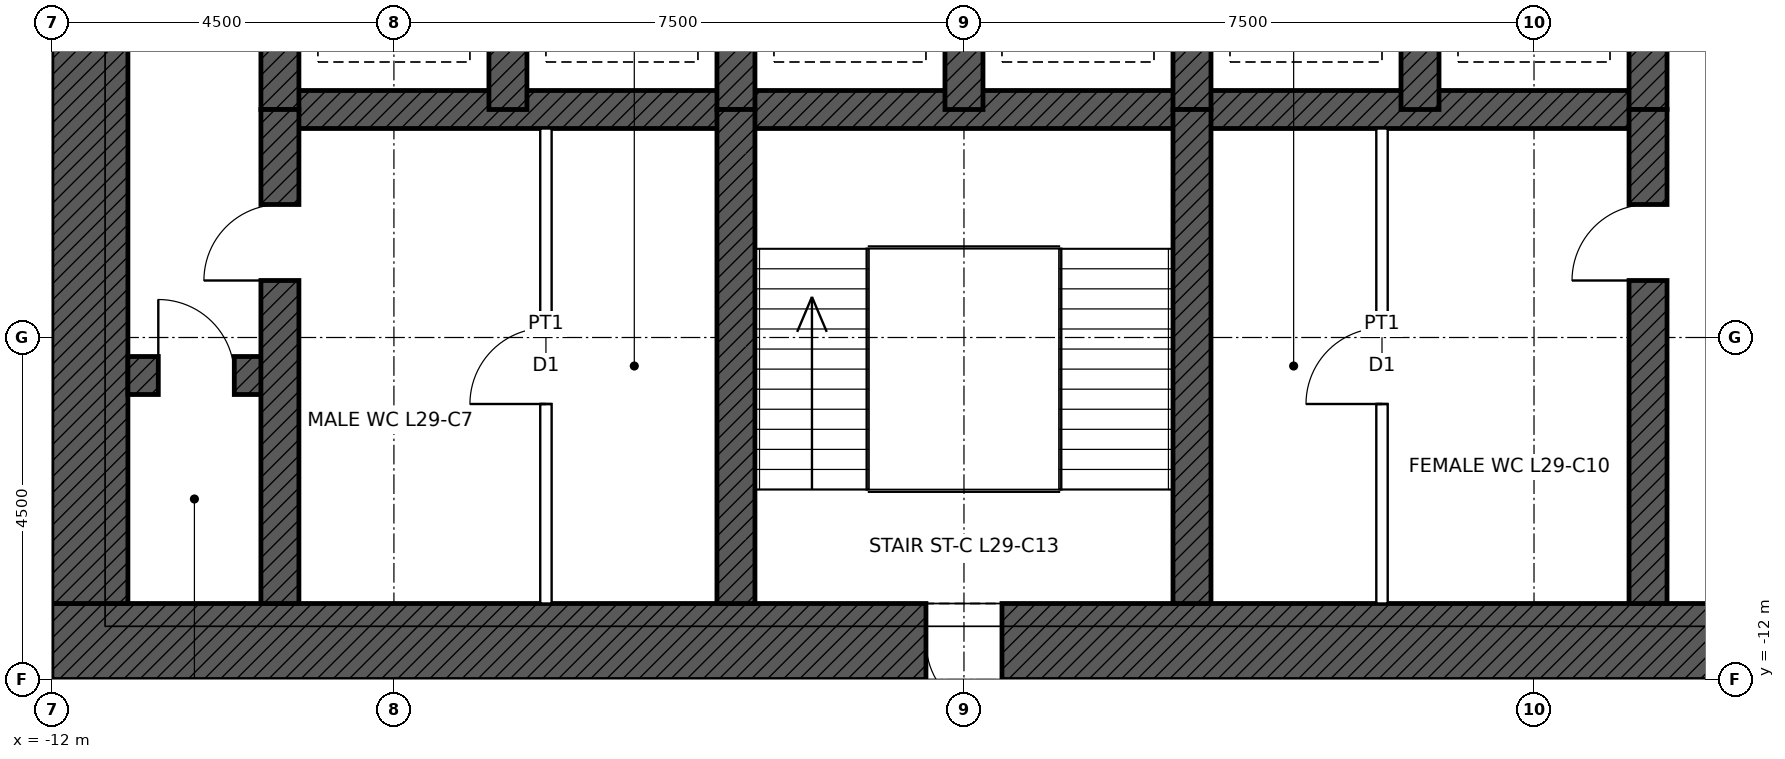
"""IFC4 building model, lengths in metres.
Left out: names, types, materials, properties, quantities, classifications, styles, units other than length and angle.
Written with IfcOpenShell. Run it as: python <this file> out.ifc"""

import sys

from ifc_helpers import new_model, si_unit, direction, frame, frame_2d, origin, place, context, subcontext, project, spatial, rectangle, extrude, element, fill, save


model = new_model("IFC4")
c1 = context("Model", 3, precision=1e-05, world=origin(), true_north=direction((0.0, 1.0)))
c2 = subcontext(c1, "Body", "Model", "MODEL_VIEW")
j1 = project(units=[si_unit("LENGTHUNIT", "METRE"), si_unit("PLANEANGLEUNIT", "RADIAN")], contexts=[c1])
p1 = place(None, origin())
s1 = spatial("IfcSite", under=j1, at=p1, CompositionType="ELEMENT")
p2 = place(p1, origin())
s2 = spatial("IfcBuilding", under=s1, at=p2, CompositionType="ELEMENT")
p3 = place(p2, frame((0.0, 0.0, 144.9)))
s3 = spatial("IfcBuildingStorey", under=s2, at=p3, CompositionType="ELEMENT", Elevation=144.9)
p4 = place(p3, frame((12.0, -11.5, 0.0), z_axis=(0.0, 0.0, 1.0), x_axis=(-1.0, 0.0, 0.0)))
e1 = element("IfcWall", 1, at=p4, inside=s3, PredefinedType="SHEAR", context=c2, shape_type="SweptSolid", body=[
    extrude(rectangle(XDim=24.0, YDim=1.0, at=frame_2d((12.0, 0.0))), origin(), (0.0, 0.0, 1.0), 4.5),
])
p5 = place(p4, frame((11.5, 0.0, 0.0)))
e2 = element("IfcOpeningElement", 2, at=p5, cuts=e1, PredefinedType="OPENING", context=c2, shape_type="SweptSolid", body=[
    extrude(rectangle(XDim=1.0, YDim=2.1, at=frame_2d((0.5, 1.05))), frame((0.0, 0.51, 0.0), z_axis=(0.0, -1.0, 0.0), x_axis=(1.0, 0.0, 0.0)), (0.0, 0.0, 1.0), 1.02),
])
p6 = place(p4, frame((1.0, 0.0, 0.0)))
e3 = element("IfcOpeningElement", 3, at=p6, cuts=e1, PredefinedType="OPENING", context=c2, shape_type="SweptSolid", body=[
    extrude(rectangle(XDim=1.0, YDim=2.4, at=frame_2d((0.5, 1.2))), frame((0.0, 0.51, 0.0), z_axis=(0.0, -1.0, 0.0), x_axis=(1.0, 0.0, 0.0)), (0.0, 0.0, 1.0), 1.02),
])
p7 = place(p3, frame((-11.5, -11.0, 0.0), z_axis=(0.0, 0.0, 1.0), x_axis=(0.0, 1.0, 0.0)))
e4 = element("IfcWall", 4, at=p7, inside=s3, PredefinedType="SHEAR", context=c2, shape_type="SweptSolid", body=[
    extrude(rectangle(XDim=22.0, YDim=1.0, at=frame_2d((11.0, 0.0))), origin(), (0.0, 0.0, 1.0), 4.5),
])
p8 = place(p7, frame((10.5, 0.0, 0.0)))
e5 = element("IfcOpeningElement", 5, at=p8, cuts=e4, PredefinedType="OPENING", context=c2, shape_type="SweptSolid", body=[
    extrude(rectangle(XDim=1.0, YDim=2.4, at=frame_2d((0.5, 1.2))), frame((0.0, 0.51, 0.0), z_axis=(0.0, -1.0, 0.0), x_axis=(1.0, 0.0, 0.0)), (0.0, 0.0, 1.0), 1.02),
])
p9 = place(p3, frame((-9.0, -4.5, 0.0), z_axis=(0.0, 0.0, 1.0), x_axis=(1.0, 0.0, 0.0)))
e6 = element("IfcWall", 6, at=p9, inside=s3, PredefinedType="SHEAR", context=c2, shape_type="SweptSolid", body=[
    extrude(rectangle(XDim=18.0, YDim=0.5, at=frame_2d((9.0, 0.0))), origin(), (0.0, 0.0, 1.0), 4.5),
])
p10 = place(p3, frame((-11.0, -8.0, 0.0), z_axis=(0.0, 0.0, 1.0), x_axis=(1.0, 0.0, 0.0)))
e7 = element("IfcWall", 7, at=p10, inside=s3, PredefinedType="SHEAR", context=c2, shape_type="SweptSolid", body=[
    extrude(rectangle(XDim=2.0, YDim=0.5, at=frame_2d((1.0, 0.0))), origin(), (0.0, 0.0, 1.0), 4.5),
])
p11 = place(p10, frame((0.4, 0.0, 0.0)))
e8 = element("IfcOpeningElement", 8, at=p11, cuts=e7, PredefinedType="OPENING", context=c2, shape_type="SweptSolid", body=[
    extrude(rectangle(XDim=1.0, YDim=2.1, at=frame_2d((0.5, 1.05))), frame((0.0, 0.26, 0.0), z_axis=(0.0, -1.0, 0.0), x_axis=(1.0, 0.0, 0.0)), (0.0, 0.0, 1.0), 0.52),
])
for number, where, z_axis, x_axis in (
    (9, (-9.0, -4.5, 0.0), (0.0, 0.0, 1.0), (0.0, 1.0, 0.0)),
    (10, (9.0, -4.5, 0.0), (0.0, 0.0, 1.0), (0.0, 1.0, 0.0)),
    (11, (-6.0, -4.5, 0.0), (0.0, 0.0, 1.0), (0.0, 1.0, 0.0)),
    (12, (-3.0, -4.5, 0.0), (0.0, 0.0, 1.0), (0.0, 1.0, 0.0)),
    (13, (0.0, -4.5, 0.0), (0.0, 0.0, 1.0), (0.0, 1.0, 0.0)),
    (14, (3.0, -4.5, 0.0), (0.0, 0.0, 1.0), (0.0, 1.0, 0.0)),
    (15, (6.0, -4.5, 0.0), (0.0, 0.0, 1.0), (0.0, 1.0, 0.0)),
):
    element("IfcWall", number, at=place(p3, frame(where, z_axis=z_axis, x_axis=x_axis)), inside=s3, PredefinedType="SHEAR", context=c2, shape_type="SweptSolid", body=[
        extrude(rectangle(XDim=3.0, YDim=0.5, at=frame_2d((1.5, 0.0))), origin(), (0.0, 0.0, 1.0), 4.5),
    ])
p12 = place(p3, frame((-9.0, -11.0, 0.0), z_axis=(0.0, 0.0, 1.0), x_axis=(0.0, 1.0, 0.0)))
e16 = element("IfcWall", 16, at=p12, inside=s3, PredefinedType="SHEAR", context=c2, shape_type="SweptSolid", body=[
    extrude(rectangle(XDim=6.5, YDim=0.5, at=frame_2d((3.25, 0.0))), origin(), (0.0, 0.0, 1.0), 4.5),
])
p13 = place(p12, frame((4.25, 0.0, 0.0)))
e17 = element("IfcOpeningElement", 17, at=p13, cuts=e16, PredefinedType="OPENING", context=c2, shape_type="SweptSolid", body=[
    extrude(rectangle(XDim=1.0, YDim=2.1, at=frame_2d((0.5, 1.05))), frame((0.0, 0.26, 0.0), z_axis=(0.0, -1.0, 0.0), x_axis=(1.0, 0.0, 0.0)), (0.0, 0.0, 1.0), 0.52),
])
p14 = place(p3, frame((9.0, -11.0, 0.0), z_axis=(0.0, 0.0, 1.0), x_axis=(0.0, 1.0, 0.0)))
e18 = element("IfcWall", 18, at=p14, inside=s3, PredefinedType="SHEAR", context=c2, shape_type="SweptSolid", body=[
    extrude(rectangle(XDim=6.5, YDim=0.5, at=frame_2d((3.25, 0.0))), origin(), (0.0, 0.0, 1.0), 4.5),
])
p15 = place(p14, frame((4.25, 0.0, 0.0)))
e19 = element("IfcOpeningElement", 19, at=p15, cuts=e18, PredefinedType="OPENING", context=c2, shape_type="SweptSolid", body=[
    extrude(rectangle(XDim=1.0, YDim=2.1, at=frame_2d((0.5, 1.05))), frame((0.0, 0.26, 0.0), z_axis=(0.0, -1.0, 0.0), x_axis=(1.0, 0.0, 0.0)), (0.0, 0.0, 1.0), 0.52),
])
for number, where, z_axis, x_axis in (
    (20, (-3.0, -11.0, 0.0), (0.0, 0.0, 1.0), (0.0, 1.0, 0.0)),
    (21, (3.0, -11.0, 0.0), (0.0, 0.0, 1.0), (0.0, 1.0, 0.0)),
):
    element("IfcWall", number, at=place(p3, frame(where, z_axis=z_axis, x_axis=x_axis)), inside=s3, PredefinedType="SHEAR", context=c2, shape_type="SweptSolid", body=[
        extrude(rectangle(XDim=6.5, YDim=0.5, at=frame_2d((3.25, 0.0))), origin(), (0.0, 0.0, 1.0), 4.5),
    ])
p16 = place(p3, frame((-5.5, -11.0, 0.0), z_axis=(0.0, 0.0, 1.0), x_axis=(0.0, 1.0, 0.0)))
e22 = element("IfcWall", 22, at=p16, inside=s3, PredefinedType="PARTITIONING", context=c2, shape_type="SweptSolid", body=[
    extrude(rectangle(XDim=6.25, YDim=0.15, at=frame_2d((3.125, 0.0))), origin(), (0.0, 0.0, 1.0), 4.25),
])
p17 = place(p16, frame((2.625, 0.0, 0.0)))
e23 = element("IfcOpeningElement", 23, at=p17, cuts=e22, PredefinedType="OPENING", context=c2, shape_type="SweptSolid", body=[
    extrude(rectangle(XDim=1.0, YDim=2.1, at=frame_2d((0.5, 1.05))), frame((0.0, 0.085, 0.0), z_axis=(0.0, -1.0, 0.0), x_axis=(1.0, 0.0, 0.0)), (0.0, 0.0, 1.0), 0.17),
])
p18 = place(p3, frame((5.5, -11.0, 0.0), z_axis=(0.0, 0.0, 1.0), x_axis=(0.0, 1.0, 0.0)))
e24 = element("IfcWall", 24, at=p18, inside=s3, PredefinedType="PARTITIONING", context=c2, shape_type="SweptSolid", body=[
    extrude(rectangle(XDim=6.25, YDim=0.15, at=frame_2d((3.125, 0.0))), origin(), (0.0, 0.0, 1.0), 4.25),
])
p19 = place(p18, frame((2.625, 0.0, 0.0)))
e25 = element("IfcOpeningElement", 25, at=p19, cuts=e24, PredefinedType="OPENING", context=c2, shape_type="SweptSolid", body=[
    extrude(rectangle(XDim=1.0, YDim=2.1, at=frame_2d((0.5, 1.05))), frame((0.0, 0.085, 0.0), z_axis=(0.0, -1.0, 0.0), x_axis=(1.0, 0.0, 0.0)), (0.0, 0.0, 1.0), 0.17),
])
p20 = place(p5, origin())
e26 = element("IfcDoor", 26, at=p20, inside=s3, OperationType="SINGLE_SWING_LEFT", PredefinedType="DOOR", context=c2, shape_type="SweptSolid", body=[
    extrude(rectangle(XDim=1.0, YDim=2.1, at=frame_2d((0.5, 1.05))), frame((0.0, 0.485, 0.0), z_axis=(0.0, -1.0, 0.0), x_axis=(1.0, 0.0, 0.0)), (0.0, 0.0, 1.0), 0.05),
])
fill(e2, e26)
p21 = place(p13, origin())
e27 = element("IfcDoor", 27, at=p21, inside=s3, OperationType="SINGLE_SWING_LEFT", PredefinedType="DOOR", context=c2, shape_type="SweptSolid", body=[
    extrude(rectangle(XDim=1.0, YDim=2.1, at=frame_2d((0.5, 1.05))), frame((0.0, 0.025, 0.0), z_axis=(0.0, -1.0, 0.0), x_axis=(1.0, 0.0, 0.0)), (0.0, 0.0, 1.0), 0.05),
])
fill(e17, e27)
p22 = place(p15, origin())
e28 = element("IfcDoor", 28, at=p22, inside=s3, OperationType="SINGLE_SWING_LEFT", PredefinedType="DOOR", context=c2, shape_type="SweptSolid", body=[
    extrude(rectangle(XDim=1.0, YDim=2.1, at=frame_2d((0.5, 1.05))), frame((0.0, 0.025, 0.0), z_axis=(0.0, -1.0, 0.0), x_axis=(1.0, 0.0, 0.0)), (0.0, 0.0, 1.0), 0.05),
])
fill(e19, e28)
p23 = place(p11, origin())
e29 = element("IfcDoor", 29, at=p23, inside=s3, OperationType="SINGLE_SWING_LEFT", PredefinedType="DOOR", context=c2, shape_type="SweptSolid", body=[
    extrude(rectangle(XDim=1.0, YDim=2.1, at=frame_2d((0.5, 1.05))), frame((0.0, 0.025, 0.0), z_axis=(0.0, -1.0, 0.0), x_axis=(1.0, 0.0, 0.0)), (0.0, 0.0, 1.0), 0.05),
])
fill(e8, e29)
p24 = place(p17, origin())
e30 = element("IfcDoor", 30, at=p24, inside=s3, OperationType="SINGLE_SWING_LEFT", PredefinedType="DOOR", context=c2, shape_type="SweptSolid", body=[
    extrude(rectangle(XDim=1.0, YDim=2.1, at=frame_2d((0.5, 1.05))), frame((0.0, 0.025, 0.0), z_axis=(0.0, -1.0, 0.0), x_axis=(1.0, 0.0, 0.0)), (0.0, 0.0, 1.0), 0.05),
])
fill(e23, e30)
p25 = place(p19, origin())
e31 = element("IfcDoor", 31, at=p25, inside=s3, OperationType="SINGLE_SWING_LEFT", PredefinedType="DOOR", context=c2, shape_type="SweptSolid", body=[
    extrude(rectangle(XDim=1.0, YDim=2.1, at=frame_2d((0.5, 1.05))), frame((0.0, 0.025, 0.0), z_axis=(0.0, -1.0, 0.0), x_axis=(1.0, 0.0, 0.0)), (0.0, 0.0, 1.0), 0.05),
])
fill(e25, e31)
save(model, sys.argv[1])
